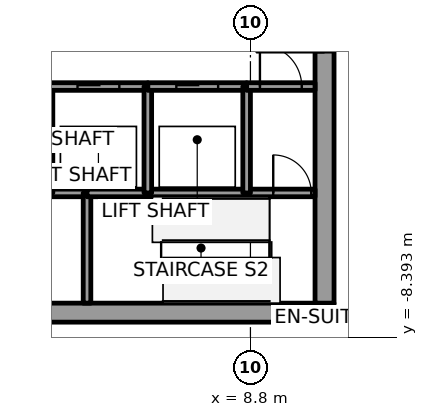
"""IFC4 building model, lengths in metres.
Left out: names, types, materials, properties, quantities, classifications, styles, units other than length and angle.
Written with IfcOpenShell. Run it as: python <this file> out.ifc"""

import sys

from ifc_helpers import new_model, si_unit, direction, frame, frame_2d, origin, place, context, subcontext, project, spatial, rectangle, extrude, element, fill, save


model = new_model("IFC4")
c1 = context("Model", 3, precision=1e-05, world=origin(), true_north=direction((0.0, 1.0)))
c2 = subcontext(c1, "Body", "Model", "MODEL_VIEW")
j1 = project(units=[si_unit("LENGTHUNIT", "METRE"), si_unit("PLANEANGLEUNIT", "RADIAN")], contexts=[c1])
p1 = place(None, origin())
s1 = spatial("IfcSite", under=j1, at=p1, CompositionType="ELEMENT")
p2 = place(p1, origin())
s2 = spatial("IfcBuilding", under=s1, at=p2, CompositionType="ELEMENT")
p3 = place(p2, frame((0.0, 0.0, 77.6)))
s3 = spatial("IfcBuildingStorey", under=s2, at=p3, CompositionType="ELEMENT", Elevation=77.6)
p4 = place(p3, frame((-11.0, -7.75, 0.0), z_axis=(0.0, 0.0, 1.0), x_axis=(1.0, 0.0, 0.0)))
e1 = element("IfcWall", 1, at=p4, inside=s3, PredefinedType="SHEAR", context=c2, shape_type="SweptSolid", body=[
    extrude(rectangle(XDim=22.0, YDim=0.5, at=frame_2d((11.0, 0.0))), origin(), (0.0, 0.0, 1.0), 3.7),
])
p5 = place(p4, frame((10.45, 0.0, 0.0)))
e2 = element("IfcOpeningElement", 2, at=p5, cuts=e1, PredefinedType="OPENING", context=c2, shape_type="SweptSolid", body=[
    extrude(rectangle(XDim=1.1, YDim=2.1, at=frame_2d((0.55, 1.05))), frame((0.0, 0.25, 0.0), z_axis=(0.0, -1.0, 0.0), x_axis=(1.0, 0.0, 0.0)), (0.0, 0.0, 1.0), 0.5),
])
p6 = place(p3, frame((10.75, -7.5, 0.0), z_axis=(0.0, 0.0, 1.0), x_axis=(0.0, 1.0, 0.0)))
e3 = element("IfcWall", 3, at=p6, inside=s3, PredefinedType="SHEAR", context=c2, shape_type="SweptSolid", body=[
    extrude(rectangle(XDim=15.0, YDim=0.5, at=frame_2d((7.5, 0.0))), origin(), (0.0, 0.0, 1.0), 3.7),
])
p7 = place(p6, frame((6.6, 0.0, 0.0)))
e4 = element("IfcOpeningElement", 4, at=p7, cuts=e3, PredefinedType="OPENING", context=c2, shape_type="SweptSolid", body=[
    extrude(rectangle(XDim=1.8, YDim=2.1, at=frame_2d((0.9, 1.05))), frame((0.0, 0.25, 0.0), z_axis=(0.0, -1.0, 0.0), x_axis=(1.0, 0.0, 0.0)), (0.0, 0.0, 1.0), 0.5),
])
p8 = place(p3, frame((4.5, -4.6, 0.0), z_axis=(0.0, 0.0, 1.0), x_axis=(-1.0, 0.0, 0.0)))
e5 = element("IfcWall", 5, at=p8, inside=s3, PredefinedType="SOLIDWALL", context=c2, shape_type="SweptSolid", body=[
    extrude(rectangle(XDim=1.0, YDim=0.2, at=frame_2d((0.5, 0.0))), origin(), (0.0, 0.0, 1.0), 3.55),
])
p9 = place(p3, frame((3.5, -1.8, 0.0), z_axis=(0.0, 0.0, 1.0), x_axis=(1.0, 0.0, 0.0)))
e6 = element("IfcWall", 6, at=p9, inside=s3, PredefinedType="SOLIDWALL", context=c2, shape_type="SweptSolid", body=[
    extrude(rectangle(XDim=2.6, YDim=0.2, at=frame_2d((1.3, 0.0))), origin(), (0.0, 0.0, 1.0), 3.55),
])
p10 = place(p9, frame((0.75, 0.0, 0.0)))
e7 = element("IfcOpeningElement", 7, at=p10, cuts=e6, PredefinedType="OPENING", context=c2, shape_type="SweptSolid", body=[
    extrude(rectangle(XDim=1.1, YDim=2.1, at=frame_2d((0.55, 1.05))), frame((0.0, 0.1, 0.0), z_axis=(0.0, -1.0, 0.0), x_axis=(1.0, 0.0, 0.0)), (0.0, 0.0, 1.0), 0.2),
])
p11 = place(p3, frame((4.5, -7.5, 0.0), z_axis=(0.0, 0.0, 1.0), x_axis=(0.0, 1.0, 0.0)))
e8 = element("IfcWall", 8, at=p11, inside=s3, PredefinedType="SOLIDWALL", context=c2, shape_type="SweptSolid", body=[
    extrude(rectangle(XDim=2.9, YDim=0.2, at=frame_2d((1.45, 0.0))), origin(), (0.0, 0.0, 1.0), 3.55),
])
p12 = place(p3, frame((4.5, -4.6, 0.0), z_axis=(0.0, 0.0, 1.0), x_axis=(1.0, 0.0, 0.0)))
e9 = element("IfcWall", 9, at=p12, inside=s3, PredefinedType="SOLIDWALL", context=c2, shape_type="SweptSolid", body=[
    extrude(rectangle(XDim=1.6, YDim=0.2, at=frame_2d((0.8, 0.0))), origin(), (0.0, 0.0, 1.0), 3.55),
])
p13 = place(p3, frame((6.1, -4.6, 0.0), z_axis=(0.0, 0.0, 1.0), x_axis=(1.0, 0.0, 0.0)))
e10 = element("IfcWall", 10, at=p13, inside=s3, PredefinedType="SOLIDWALL", context=c2, shape_type="SweptSolid", body=[
    extrude(rectangle(XDim=2.6, YDim=0.2, at=frame_2d((1.3, 0.0))), origin(), (0.0, 0.0, 1.0), 3.55),
])
p14 = place(p3, frame((6.1, -4.6, 0.0), z_axis=(0.0, 0.0, 1.0), x_axis=(0.0, 1.0, 0.0)))
e11 = element("IfcWall", 11, at=p14, inside=s3, PredefinedType="SOLIDWALL", context=c2, shape_type="SweptSolid", body=[
    extrude(rectangle(XDim=2.8, YDim=0.2, at=frame_2d((1.4, 0.0))), origin(), (0.0, 0.0, 1.0), 3.55),
])
p15 = place(p3, frame((6.1, -1.8, 0.0), z_axis=(0.0, 0.0, 1.0), x_axis=(1.0, 0.0, 0.0)))
e12 = element("IfcWall", 12, at=p15, inside=s3, PredefinedType="SOLIDWALL", context=c2, shape_type="SweptSolid", body=[
    extrude(rectangle(XDim=2.6, YDim=0.2, at=frame_2d((1.3, 0.0))), origin(), (0.0, 0.0, 1.0), 3.55),
])
p16 = place(p15, frame((0.75, 0.0, 0.0)))
e13 = element("IfcOpeningElement", 13, at=p16, cuts=e12, PredefinedType="OPENING", context=c2, shape_type="SweptSolid", body=[
    extrude(rectangle(XDim=1.1, YDim=2.1, at=frame_2d((0.55, 1.05))), frame((0.0, 0.1, 0.0), z_axis=(0.0, -1.0, 0.0), x_axis=(1.0, 0.0, 0.0)), (0.0, 0.0, 1.0), 0.2),
])
p17 = place(p3, frame((8.7, -4.6, 0.0), z_axis=(0.0, 0.0, 1.0), x_axis=(1.0, 0.0, 0.0)))
e14 = element("IfcWall", 14, at=p17, inside=s3, PredefinedType="SOLIDWALL", context=c2, shape_type="SweptSolid", body=[
    extrude(rectangle(XDim=1.8, YDim=0.2, at=frame_2d((0.9, 0.0))), origin(), (0.0, 0.0, 1.0), 3.55),
])
p18 = place(p17, frame((0.7, 0.0, 0.0)))
e15 = element("IfcOpeningElement", 15, at=p18, cuts=e14, PredefinedType="OPENING", context=c2, shape_type="SweptSolid", body=[
    extrude(rectangle(XDim=1.0, YDim=2.1, at=frame_2d((0.5, 1.05))), frame((0.0, 0.1, 0.0), z_axis=(0.0, -1.0, 0.0), x_axis=(1.0, 0.0, 0.0)), (0.0, 0.0, 1.0), 0.2),
])
p19 = place(p3, frame((8.7, -1.8, 0.0), z_axis=(0.0, 0.0, 1.0), x_axis=(0.0, -1.0, 0.0)))
e16 = element("IfcWall", 16, at=p19, inside=s3, PredefinedType="SOLIDWALL", context=c2, shape_type="SweptSolid", body=[
    extrude(rectangle(XDim=2.8, YDim=0.2, at=frame_2d((1.4, 0.0))), origin(), (0.0, 0.0, 1.0), 3.55),
])
p20 = place(p3, frame((8.7, -1.8, 0.0), z_axis=(0.0, 0.0, 1.0), x_axis=(1.0, 0.0, 0.0)))
e17 = element("IfcWall", 17, at=p20, inside=s3, PredefinedType="SOLIDWALL", context=c2, shape_type="SweptSolid", body=[
    extrude(rectangle(XDim=1.8, YDim=0.2, at=frame_2d((0.9, 0.0))), origin(), (0.0, 0.0, 1.0), 3.55),
])
p21 = place(p20, frame((0.35, 0.0, 0.0)))
e18 = element("IfcOpeningElement", 18, at=p21, cuts=e17, PredefinedType="OPENING", context=c2, shape_type="SweptSolid", body=[
    extrude(rectangle(XDim=1.1, YDim=2.1, at=frame_2d((0.55, 1.05))), frame((0.0, 0.1, 0.0), z_axis=(0.0, -1.0, 0.0), x_axis=(1.0, 0.0, 0.0)), (0.0, 0.0, 1.0), 0.2),
])
p22 = place(p10, origin())
e19 = element("IfcDoor", 19, at=p22, inside=s3, OperationType="SLIDING_TO_RIGHT", PredefinedType="DOOR", context=c2, shape_type="SweptSolid", body=[
    extrude(rectangle(XDim=1.1, YDim=2.1, at=frame_2d((0.55, 1.05))), frame((0.0, 0.025, 0.0), z_axis=(0.0, -1.0, 0.0), x_axis=(1.0, 0.0, 0.0)), (0.0, 0.0, 1.0), 0.05),
])
fill(e7, e19)
p23 = place(p16, origin())
e20 = element("IfcDoor", 20, at=p23, inside=s3, OperationType="SLIDING_TO_LEFT", PredefinedType="DOOR", context=c2, shape_type="SweptSolid", body=[
    extrude(rectangle(XDim=1.1, YDim=2.1, at=frame_2d((0.55, 1.05))), frame((0.0, 0.025, 0.0), z_axis=(0.0, -1.0, 0.0), x_axis=(1.0, 0.0, 0.0)), (0.0, 0.0, 1.0), 0.05),
])
fill(e13, e20)
p24 = place(p21, origin())
e21 = element("IfcDoor", 21, at=p24, inside=s3, OperationType="SINGLE_SWING_RIGHT", PredefinedType="DOOR", context=c2, shape_type="SweptSolid", body=[
    extrude(rectangle(XDim=1.1, YDim=2.1, at=frame_2d((0.55, 1.05))), frame((0.0, 0.025, 0.0), z_axis=(0.0, -1.0, 0.0), x_axis=(1.0, 0.0, 0.0)), (0.0, 0.0, 1.0), 0.05),
])
fill(e18, e21)
p25 = place(p18, origin())
e22 = element("IfcDoor", 22, at=p25, inside=s3, OperationType="SINGLE_SWING_RIGHT", PredefinedType="DOOR", context=c2, shape_type="SweptSolid", body=[
    extrude(rectangle(XDim=1.0, YDim=2.1, at=frame_2d((0.5, 1.05))), frame((0.0, 0.025, 0.0), z_axis=(0.0, -1.0, 0.0), x_axis=(1.0, 0.0, 0.0)), (0.0, 0.0, 1.0), 0.05),
])
fill(e15, e22)
p26 = place(p7, origin())
e23 = element("IfcDoor", 23, at=p26, inside=s3, OperationType="DOUBLE_DOOR_SINGLE_SWING", PredefinedType="DOOR", context=c2, shape_type="SweptSolid", body=[
    extrude(rectangle(XDim=1.8, YDim=2.1, at=frame_2d((0.9, 1.05))), frame((0.0, 0.025, 0.0), z_axis=(0.0, -1.0, 0.0), x_axis=(1.0, 0.0, 0.0)), (0.0, 0.0, 1.0), 0.05),
])
fill(e4, e23)
save(model, sys.argv[1])
